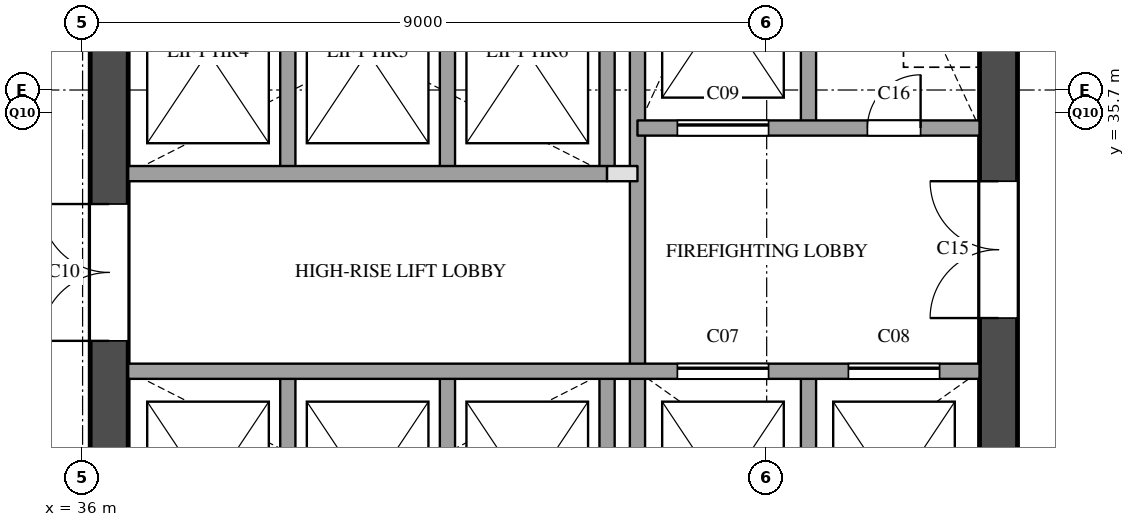
"""IFC4 building model, lengths in metres.
Left out: names, types, materials, properties, quantities, classifications, styles, units other than length and angle.
Written with IfcOpenShell. Run it as: python <this file> out.ifc"""

import sys

from ifc_helpers import new_model, si_unit, direction, frame, frame_2d, origin, place, context, subcontext, project, spatial, rectangle, extrude, element, fill, save


model = new_model("IFC4")
c1 = context("Model", 3, precision=1e-05, world=origin(), true_north=direction((0.0, 1.0)))
c2 = subcontext(c1, "Body", "Model", "MODEL_VIEW")
j1 = project(units=[si_unit("LENGTHUNIT", "METRE"), si_unit("PLANEANGLEUNIT", "RADIAN")], contexts=[c1])
p1 = place(None, origin())
s1 = spatial("IfcSite", under=j1, at=p1, CompositionType="ELEMENT")
p2 = place(p1, origin())
s2 = spatial("IfcBuilding", under=s1, at=p2, CompositionType="ELEMENT")
p3 = place(p2, frame((0.0, 0.0, 181.7)))
s3 = spatial("IfcBuildingStorey", under=s2, at=p3, CompositionType="ELEMENT", Elevation=181.7)
p4 = place(p3, frame((36.35, 29.1, 0.0), z_axis=(0.0, 0.0, 1.0), x_axis=(0.0, 1.0, 0.0)))
e1 = element("IfcWall", 1, at=p4, inside=s3, PredefinedType="SHEAR", context=c2, shape_type="SweptSolid", body=[
    extrude(rectangle(XDim=20.3, YDim=0.5, at=frame_2d((10.15, 0.0))), origin(), (0.0, 0.0, 1.0), 3.6),
])
p5 = place(p4, frame((3.6, 0.0, 0.0)))
e2 = element("IfcOpeningElement", 2, at=p5, cuts=e1, PredefinedType="OPENING", context=c2, shape_type="SweptSolid", body=[
    extrude(rectangle(XDim=1.8, YDim=2.1, at=frame_2d((0.9, 1.05))), frame((0.0, 0.26, 0.0), z_axis=(0.0, -1.0, 0.0), x_axis=(1.0, 0.0, 0.0)), (0.0, 0.0, 1.0), 0.52),
])
p6 = place(p4, frame((16.4, 0.0, 0.0)))
e3 = element("IfcOpeningElement", 3, at=p6, cuts=e1, PredefinedType="OPENING", context=c2, shape_type="SweptSolid", body=[
    extrude(rectangle(XDim=1.0, YDim=2.1, at=frame_2d((0.5, 1.05))), frame((0.0, 0.26, 0.0), z_axis=(0.0, -1.0, 0.0), x_axis=(1.0, 0.0, 0.0)), (0.0, 0.0, 1.0), 0.52),
])
p7 = place(p3, frame((48.05, 29.1, 0.0), z_axis=(0.0, 0.0, 1.0), x_axis=(0.0, 1.0, 0.0)))
e4 = element("IfcWall", 4, at=p7, inside=s3, PredefinedType="SHEAR", context=c2, shape_type="SweptSolid", body=[
    extrude(rectangle(XDim=20.3, YDim=0.5, at=frame_2d((10.15, 0.0))), origin(), (0.0, 0.0, 1.0), 3.6),
])
p8 = place(p7, frame((12.5, 0.0, 0.0)))
e5 = element("IfcOpeningElement", 5, at=p8, cuts=e4, PredefinedType="OPENING", context=c2, shape_type="SweptSolid", body=[
    extrude(rectangle(XDim=0.7, YDim=2.1, at=frame_2d((0.35, 1.05))), frame((0.0, 0.26, 0.0), z_axis=(0.0, -1.0, 0.0), x_axis=(1.0, 0.0, 0.0)), (0.0, 0.0, 1.0), 0.52),
])
p9 = place(p7, frame((3.9, 0.0, 0.0)))
e6 = element("IfcOpeningElement", 6, at=p9, cuts=e4, PredefinedType="OPENING", context=c2, shape_type="SweptSolid", body=[
    extrude(rectangle(XDim=1.8, YDim=2.1, at=frame_2d((0.9, 1.05))), frame((0.0, 0.26, 0.0), z_axis=(0.0, -1.0, 0.0), x_axis=(1.0, 0.0, 0.0)), (0.0, 0.0, 1.0), 0.52),
])
p10 = place(p3, frame((38.7, 29.1, 0.0), z_axis=(0.0, 0.0, 1.0), x_axis=(0.0, 1.0, 0.0)))
e7 = element("IfcWall", 7, at=p10, inside=s3, PredefinedType="SOLIDWALL", context=c2, shape_type="SweptSolid", body=[
    extrude(rectangle(XDim=3.2, YDim=0.2, at=frame_2d((1.6, 0.0))), origin(), (0.0, 0.0, 1.0), 3.6),
])
p11 = place(p3, frame((38.7, 34.9, 0.0), z_axis=(0.0, 0.0, 1.0), x_axis=(0.0, 1.0, 0.0)))
e8 = element("IfcWall", 8, at=p11, inside=s3, PredefinedType="SOLIDWALL", context=c2, shape_type="SweptSolid", body=[
    extrude(rectangle(XDim=3.2, YDim=0.2, at=frame_2d((1.6, 0.0))), origin(), (0.0, 0.0, 1.0), 3.6),
])
p12 = place(p3, frame((40.8, 29.1, 0.0), z_axis=(0.0, 0.0, 1.0), x_axis=(0.0, 1.0, 0.0)))
e9 = element("IfcWall", 9, at=p12, inside=s3, PredefinedType="SOLIDWALL", context=c2, shape_type="SweptSolid", body=[
    extrude(rectangle(XDim=3.2, YDim=0.2, at=frame_2d((1.6, 0.0))), origin(), (0.0, 0.0, 1.0), 3.6),
])
p13 = place(p3, frame((40.8, 34.9, 0.0), z_axis=(0.0, 0.0, 1.0), x_axis=(0.0, 1.0, 0.0)))
e10 = element("IfcWall", 10, at=p13, inside=s3, PredefinedType="SOLIDWALL", context=c2, shape_type="SweptSolid", body=[
    extrude(rectangle(XDim=3.2, YDim=0.2, at=frame_2d((1.6, 0.0))), origin(), (0.0, 0.0, 1.0), 3.6),
])
p14 = place(p3, frame((42.9, 29.1, 0.0), z_axis=(0.0, 0.0, 1.0), x_axis=(0.0, 1.0, 0.0)))
e11 = element("IfcWall", 11, at=p14, inside=s3, PredefinedType="SOLIDWALL", context=c2, shape_type="SweptSolid", body=[
    extrude(rectangle(XDim=3.2, YDim=0.2, at=frame_2d((1.6, 0.0))), origin(), (0.0, 0.0, 1.0), 3.6),
])
p15 = place(p3, frame((42.9, 34.9, 0.0), z_axis=(0.0, 0.0, 1.0), x_axis=(0.0, 1.0, 0.0)))
e12 = element("IfcWall", 12, at=p15, inside=s3, PredefinedType="SOLIDWALL", context=c2, shape_type="SweptSolid", body=[
    extrude(rectangle(XDim=3.2, YDim=0.2, at=frame_2d((1.6, 0.0))), origin(), (0.0, 0.0, 1.0), 3.6),
])
p16 = place(p3, frame((43.3, 29.1, 0.0), z_axis=(0.0, 0.0, 1.0), x_axis=(0.0, 1.0, 0.0)))
e13 = element("IfcWall", 13, at=p16, inside=s3, PredefinedType="SOLIDWALL", context=c2, shape_type="SweptSolid", body=[
    extrude(rectangle(XDim=9.9, YDim=0.2, at=frame_2d((4.95, 0.0))), origin(), (0.0, 0.0, 1.0), 3.6),
])
for number, where, z_axis, x_axis in (
    (14, (45.55, 29.1, 0.0), (0.0, 0.0, 1.0), (0.0, 1.0, 0.0)),
    (15, (45.55, 35.5, 0.0), (0.0, 0.0, 1.0), (0.0, 1.0, 0.0)),
):
    element("IfcWall", number, at=place(p3, frame(where, z_axis=z_axis, x_axis=x_axis)), inside=s3, PredefinedType="SOLIDWALL", context=c2, shape_type="SweptSolid", body=[
        extrude(rectangle(XDim=3.2, YDim=0.2, at=frame_2d((1.6, 0.0))), origin(), (0.0, 0.0, 1.0), 3.6),
    ])
p17 = place(p3, frame((36.6, 32.3, 0.0), z_axis=(0.0, 0.0, 1.0), x_axis=(1.0, 0.0, 0.0)))
e16 = element("IfcWall", 16, at=p17, inside=s3, PredefinedType="SOLIDWALL", context=c2, shape_type="SweptSolid", body=[
    extrude(rectangle(XDim=11.2, YDim=0.2, at=frame_2d((5.6, 0.0))), origin(), (0.0, 0.0, 1.0), 3.6),
])
p18 = place(p17, frame((7.225, 0.0, 0.0)))
e17 = element("IfcOpeningElement", 17, at=p18, cuts=e16, PredefinedType="OPENING", context=c2, shape_type="SweptSolid", body=[
    extrude(rectangle(XDim=1.2, YDim=2.1, at=frame_2d((0.6, 1.05))), frame((0.0, 0.11, 0.0), z_axis=(0.0, -1.0, 0.0), x_axis=(1.0, 0.0, 0.0)), (0.0, 0.0, 1.0), 0.22),
])
p19 = place(p17, frame((9.475, 0.0, 0.0)))
e18 = element("IfcOpeningElement", 18, at=p19, cuts=e16, PredefinedType="OPENING", context=c2, shape_type="SweptSolid", body=[
    extrude(rectangle(XDim=1.2, YDim=2.1, at=frame_2d((0.6, 1.05))), frame((0.0, 0.11, 0.0), z_axis=(0.0, -1.0, 0.0), x_axis=(1.0, 0.0, 0.0)), (0.0, 0.0, 1.0), 0.22),
])
p20 = place(p3, frame((42.9, 34.9, 0.0), z_axis=(0.0, 0.0, 1.0), x_axis=(1.0, 0.0, 0.0)))
e19 = element("IfcWall", 19, at=p20, inside=s3, PredefinedType="PARTITIONING", context=c2, shape_type="SweptSolid", body=[
    extrude(rectangle(XDim=0.4, YDim=0.2, at=frame_2d((0.2, 0.0))), origin(), (0.0, 0.0, 1.0), 3.6),
])
p21 = place(p3, frame((36.6, 34.9, 0.0), z_axis=(0.0, 0.0, 1.0), x_axis=(1.0, 0.0, 0.0)))
e20 = element("IfcWall", 20, at=p21, inside=s3, PredefinedType="SOLIDWALL", context=c2, shape_type="SweptSolid", body=[
    extrude(rectangle(XDim=6.3, YDim=0.2, at=frame_2d((3.15, 0.0))), origin(), (0.0, 0.0, 1.0), 3.6),
])
p22 = place(p3, frame((43.3, 35.5, 0.0), z_axis=(0.0, 0.0, 1.0), x_axis=(1.0, 0.0, 0.0)))
e21 = element("IfcWall", 21, at=p22, inside=s3, PredefinedType="SOLIDWALL", context=c2, shape_type="SweptSolid", body=[
    extrude(rectangle(XDim=4.5, YDim=0.2, at=frame_2d((2.25, 0.0))), origin(), (0.0, 0.0, 1.0), 3.6),
])
p23 = place(p22, frame((0.525, 0.0, 0.0)))
e22 = element("IfcOpeningElement", 22, at=p23, cuts=e21, PredefinedType="OPENING", context=c2, shape_type="SweptSolid", body=[
    extrude(rectangle(XDim=1.2, YDim=2.1, at=frame_2d((0.6, 1.05))), frame((0.0, 0.11, 0.0), z_axis=(0.0, -1.0, 0.0), x_axis=(1.0, 0.0, 0.0)), (0.0, 0.0, 1.0), 0.22),
])
p24 = place(p22, frame((3.025, 0.0, 0.0)))
e23 = element("IfcOpeningElement", 23, at=p24, cuts=e21, PredefinedType="OPENING", context=c2, shape_type="SweptSolid", body=[
    extrude(rectangle(XDim=0.7, YDim=2.1, at=frame_2d((0.35, 1.05))), frame((0.0, 0.11, 0.0), z_axis=(0.0, -1.0, 0.0), x_axis=(1.0, 0.0, 0.0)), (0.0, 0.0, 1.0), 0.22),
])
p25 = place(p18, origin())
e24 = element("IfcDoor", 24, at=p25, inside=s3, OperationType="SLIDING_TO_LEFT", PredefinedType="DOOR", context=c2, shape_type="SweptSolid", body=[
    extrude(rectangle(XDim=1.2, YDim=2.1, at=frame_2d((0.6, 1.05))), frame((0.0, 0.025, 0.0), z_axis=(0.0, -1.0, 0.0), x_axis=(1.0, 0.0, 0.0)), (0.0, 0.0, 1.0), 0.05),
])
fill(e17, e24)
p26 = place(p19, origin())
e25 = element("IfcDoor", 25, at=p26, inside=s3, OperationType="SLIDING_TO_LEFT", PredefinedType="DOOR", context=c2, shape_type="SweptSolid", body=[
    extrude(rectangle(XDim=1.2, YDim=2.1, at=frame_2d((0.6, 1.05))), frame((0.0, 0.025, 0.0), z_axis=(0.0, -1.0, 0.0), x_axis=(1.0, 0.0, 0.0)), (0.0, 0.0, 1.0), 0.05),
])
fill(e18, e25)
p27 = place(p23, origin())
e26 = element("IfcDoor", 26, at=p27, inside=s3, OperationType="SLIDING_TO_LEFT", PredefinedType="DOOR", context=c2, shape_type="SweptSolid", body=[
    extrude(rectangle(XDim=1.2, YDim=2.1, at=frame_2d((0.6, 1.05))), frame((0.0, 0.025, 0.0), z_axis=(0.0, -1.0, 0.0), x_axis=(1.0, 0.0, 0.0)), (0.0, 0.0, 1.0), 0.05),
])
fill(e22, e26)
p28 = place(p5, origin())
e27 = element("IfcDoor", 27, at=p28, inside=s3, OperationType="DOUBLE_DOOR_SINGLE_SWING", PredefinedType="DOOR", context=c2, shape_type="SweptSolid", body=[
    extrude(rectangle(XDim=1.8, YDim=2.1, at=frame_2d((0.9, 1.05))), frame((0.0, 0.025, 0.0), z_axis=(0.0, -1.0, 0.0), x_axis=(1.0, 0.0, 0.0)), (0.0, 0.0, 1.0), 0.05),
])
fill(e2, e27)
p29 = place(p9, origin())
e28 = element("IfcDoor", 28, at=p29, inside=s3, OperationType="DOUBLE_DOOR_SINGLE_SWING", PredefinedType="DOOR", context=c2, shape_type="SweptSolid", body=[
    extrude(rectangle(XDim=1.8, YDim=2.1, at=frame_2d((0.9, 1.05))), frame((0.0, 0.025, 0.0), z_axis=(0.0, -1.0, 0.0), x_axis=(1.0, 0.0, 0.0)), (0.0, 0.0, 1.0), 0.05),
])
fill(e6, e28)
p30 = place(p24, origin())
e29 = element("IfcDoor", 29, at=p30, inside=s3, OperationType="SINGLE_SWING_RIGHT", PredefinedType="DOOR", context=c2, shape_type="SweptSolid", body=[
    extrude(rectangle(XDim=0.7, YDim=2.1, at=frame_2d((0.35, 1.05))), frame((0.0, 0.025, 0.0), z_axis=(0.0, -1.0, 0.0), x_axis=(1.0, 0.0, 0.0)), (0.0, 0.0, 1.0), 0.05),
])
fill(e23, e29)
save(model, sys.argv[1])
